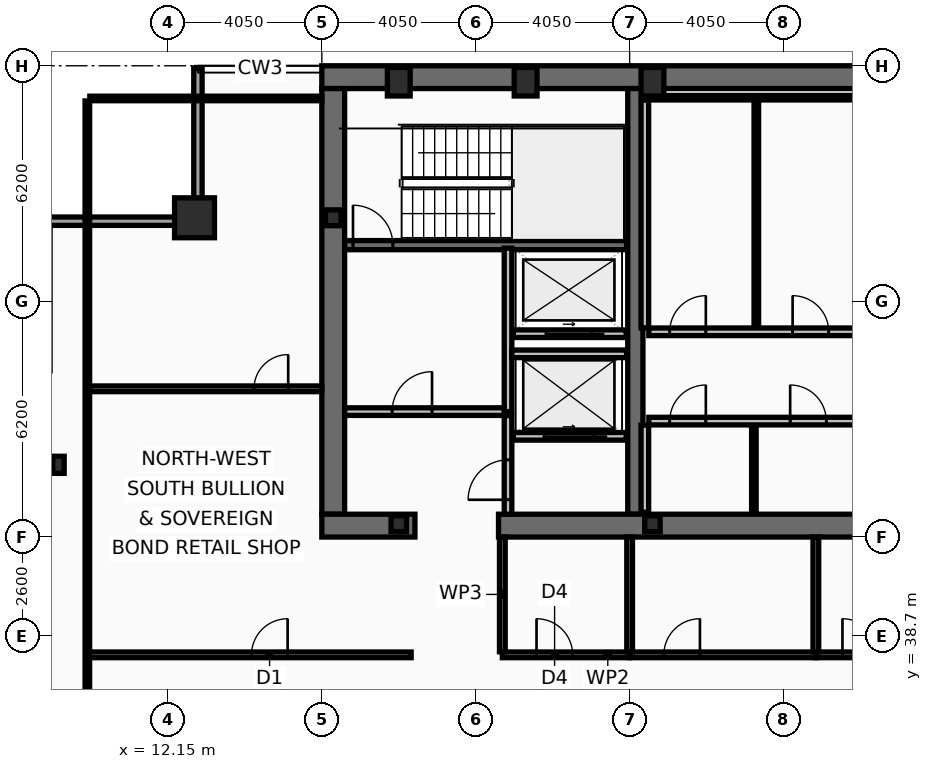
"""IFC4 building model, lengths in metres.
Left out: names, types, materials, properties, quantities, classifications, styles, units other than length and angle.
Written with IfcOpenShell. Run it as: python <this file> out.ifc"""

import sys

from ifc_helpers import new_model, si_unit, direction, frame, frame_2d, origin, origin_2d, place, context, subcontext, project, spatial, rectangle, hollow_rectangle, i_section, extrude, element, fill, save


model = new_model("IFC4")
c1 = context("Model", 3, precision=1e-05, world=origin(), true_north=direction((0.0, 1.0)))
c2 = subcontext(c1, "Body", "Model", "MODEL_VIEW")
j1 = project(units=[si_unit("LENGTHUNIT", "METRE"), si_unit("PLANEANGLEUNIT", "RADIAN")], contexts=[c1])
p1 = place(None, origin())
s1 = spatial("IfcSite", under=j1, at=p1, CompositionType="ELEMENT")
p2 = place(p1, origin())
s2 = spatial("IfcBuilding", under=s1, at=p2, CompositionType="ELEMENT")
p3 = place(p2, frame((0.0, 0.0, 253.4)))
s3 = spatial("IfcBuildingStorey", under=s2, at=p3, CompositionType="ELEMENT", Elevation=253.4)
p4 = place(p3, frame((16.2, 53.4, 0.0), z_axis=(0.0, 0.0, 1.0), x_axis=(1.0, 0.0, 0.0)))
e1 = element("IfcWall", 1, at=p4, inside=s3, PredefinedType="SHEAR", context=c2, shape_type="SweptSolid", body=[
    extrude(rectangle(XDim=40.5, YDim=0.6, at=frame_2d((20.25, 0.0))), origin(), (0.0, 0.0, 1.0), 3.38),
])
p5 = place(p3, frame((16.5, 41.9, 0.0), z_axis=(0.0, 0.0, 1.0), x_axis=(0.0, 1.0, 0.0)))
e2 = element("IfcWall", 2, at=p5, inside=s3, PredefinedType="SHEAR", context=c2, shape_type="SweptSolid", body=[
    extrude(rectangle(XDim=11.2, YDim=0.6, at=frame_2d((5.6, 0.0))), origin(), (0.0, 0.0, 1.0), 3.38),
])
p6 = place(p3, frame((24.45, 41.9, 0.0), z_axis=(0.0, 0.0, 1.0), x_axis=(0.0, 1.0, 0.0)))
e3 = element("IfcWall", 3, at=p6, inside=s3, PredefinedType="SHEAR", context=c2, shape_type="SweptSolid", body=[
    extrude(rectangle(XDim=11.2, YDim=0.4, at=frame_2d((5.6, 0.0))), origin(), (0.0, 0.0, 1.0), 3.38),
])
p7 = place(p3, frame((18.65, 41.6, 0.0), z_axis=(0.0, 0.0, 1.0), x_axis=(-1.0, 0.0, 0.0)))
e4 = element("IfcWall", 4, at=p7, inside=s3, PredefinedType="SHEAR", context=c2, shape_type="SweptSolid", body=[
    extrude(rectangle(XDim=2.45, YDim=0.6, at=frame_2d((1.225, 0.0))), origin(), (0.0, 0.0, 1.0), 3.38),
])
p8 = place(p3, frame((32.3, 41.6, 0.0), z_axis=(0.0, 0.0, 1.0), x_axis=(-1.0, 0.0, 0.0)))
e5 = element("IfcWall", 5, at=p8, inside=s3, PredefinedType="SHEAR", context=c2, shape_type="SweptSolid", body=[
    extrude(rectangle(XDim=11.45, YDim=0.6, at=frame_2d((5.725, 0.0))), origin(), (0.0, 0.0, 1.0), 3.38),
])
p9 = place(p3, frame((16.8, 48.98, 0.0), z_axis=(0.0, 0.0, 1.0), x_axis=(1.0, 0.0, 0.0)))
e6 = element("IfcWall", 6, at=p9, inside=s3, PredefinedType="SHEAR", context=c2, shape_type="SweptSolid", body=[
    extrude(rectangle(XDim=7.42, YDim=0.24, at=frame_2d((3.71, 0.0))), origin(), (0.0, 0.0, 1.0), 3.38),
])
p10 = place(p9, frame((0.22, 0.0, 0.0)))
e7 = element("IfcOpeningElement", 7, at=p10, cuts=e6, PredefinedType="OPENING", context=c2, shape_type="SweptSolid", body=[
    extrude(rectangle(XDim=1.05, YDim=2.15, at=frame_2d((0.525, 1.075))), frame((0.0, 0.13, 0.0), z_axis=(0.0, -1.0, 0.0), x_axis=(1.0, 0.0, 0.0)), (0.0, 0.0, 1.0), 0.26),
])
p11 = place(p3, frame((12.85, 49.7, 0.0), z_axis=(0.0, 0.0, 1.0), x_axis=(1.0, 0.0, 0.0)))
e8 = element("IfcColumn", 8, at=p11, inside=s3, PredefinedType="COLUMN", context=c2, shape_type="SweptSolid", body=[
    extrude(hollow_rectangle(XDim=1.05, YDim=1.05, WallThickness=0.055, at=origin_2d()), origin(), (0.0, 0.0, 1.0), 3.6),
])
for number, where, z_axis, x_axis in (
    (9, (18.225, 53.28, 0.0), (0.0, 0.0, 1.0), (1.0, 0.0, 0.0)),
    (10, (21.562, 53.28, 0.0), (0.0, 0.0, 1.0), (1.0, 0.0, 0.0)),
    (11, (24.9, 53.28, 0.0), (0.0, 0.0, 1.0), (1.0, 0.0, 0.0)),
):
    element("IfcColumn", number, at=place(p3, frame(where, z_axis=z_axis, x_axis=x_axis)), inside=s3, PredefinedType="COLUMN", context=c2, shape_type="SweptSolid", body=[
        extrude(hollow_rectangle(XDim=0.6, YDim=0.75, WallThickness=0.045, at=origin_2d()), origin(), (0.0, 0.0, 1.0), 3.6),
    ])
p12 = place(p3, frame((9.27, 43.2, 0.0), z_axis=(0.0, 0.0, 1.0), x_axis=(1.0, 0.0, 0.0)))
e12 = element("IfcColumn", 12, at=p12, inside=s3, PredefinedType="COLUMN", context=c2, shape_type="SweptSolid", body=[
    extrude(i_section(OverallWidth=0.3, OverallDepth=0.45, WebThickness=0.014, FlangeThickness=0.026, at=origin_2d()), origin(), (0.0, 0.0, 1.0), 3.6),
])
for number, where, z_axis, x_axis in (
    (13, (16.5, 49.7, 0.0), (0.0, 0.0, 1.0), (1.0, 0.0, 0.0)),
    (14, (18.225, 41.65, 0.0), (0.0, 0.0, 1.0), (1.0, 0.0, 0.0)),
    (15, (24.9, 41.65, 0.0), (0.0, 0.0, 1.0), (1.0, 0.0, 0.0)),
):
    element("IfcColumn", number, at=place(p3, frame(where, z_axis=z_axis, x_axis=x_axis)), inside=s3, PredefinedType="COLUMN", context=c2, shape_type="SweptSolid", body=[
        extrude(i_section(OverallWidth=0.406, OverallDepth=0.416, WebThickness=0.03, FlangeThickness=0.048, at=origin_2d()), origin(), (0.0, 0.0, 1.0), 3.6),
    ])
p13 = place(p3, frame((8.83, 49.61, 0.0), z_axis=(0.0, 0.0, 1.0), x_axis=(1.0, 0.0, 0.0)))
e16 = element("IfcWall", 16, at=p13, inside=s3, PredefinedType="SOLIDWALL", context=c2, shape_type="SweptSolid", body=[
    extrude(rectangle(XDim=4.22, YDim=0.22, at=frame_2d((2.11, 0.0))), origin(), (0.0, 0.0, 1.0), 2.77),
])
p14 = place(p3, frame((12.94, 49.72, 0.0), z_axis=(0.0, 0.0, 1.0), x_axis=(0.0, 1.0, 0.0)))
e17 = element("IfcWall", 17, at=p14, inside=s3, PredefinedType="SOLIDWALL", context=c2, shape_type="SweptSolid", body=[
    extrude(rectangle(XDim=3.91, YDim=0.22, at=frame_2d((1.955, 0.0))), origin(), (0.0, 0.0, 1.0), 2.77),
])
p15 = place(p3, frame((24.21, 43.95, 0.0), z_axis=(0.0, 0.0, 1.0), x_axis=(-1.0, 0.0, 0.0)))
e18 = element("IfcWall", 18, at=p15, inside=s3, PredefinedType="PARTITIONING", context=c2, shape_type="SweptSolid", body=[
    extrude(rectangle(XDim=2.97, YDim=0.2, at=frame_2d((1.485, 0.0))), origin(), (0.0, 0.0, 1.0), 3.38),
])
p16 = place(p15, frame((0.86, 0.0, 0.0)))
e19 = element("IfcOpeningElement", 19, at=p16, cuts=e18, PredefinedType="OPENING", context=c2, shape_type="SweptSolid", body=[
    extrude(rectangle(XDim=1.3, YDim=2.18, at=frame_2d((0.65, 1.09))), frame((0.0, 0.11, 0.0), z_axis=(0.0, -1.0, 0.0), x_axis=(1.0, 0.0, 0.0)), (0.0, 0.0, 1.0), 0.22),
])
p17 = place(p3, frame((24.21, 46.65, 0.0), z_axis=(0.0, 0.0, 1.0), x_axis=(-1.0, 0.0, 0.0)))
e20 = element("IfcWall", 20, at=p17, inside=s3, PredefinedType="PARTITIONING", context=c2, shape_type="SweptSolid", body=[
    extrude(rectangle(XDim=2.97, YDim=0.2, at=frame_2d((1.485, 0.0))), origin(), (0.0, 0.0, 1.0), 3.38),
])
p18 = place(p17, frame((0.91, 0.0, 0.0)))
e21 = element("IfcOpeningElement", 21, at=p18, cuts=e20, PredefinedType="OPENING", context=c2, shape_type="SweptSolid", body=[
    extrude(rectangle(XDim=1.2, YDim=2.18, at=frame_2d((0.6, 1.09))), frame((0.0, 0.11, 0.0), z_axis=(0.0, -1.0, 0.0), x_axis=(1.0, 0.0, 0.0)), (0.0, 0.0, 1.0), 0.22),
])
p19 = place(p3, frame((21.1, 44.6, 0.0), z_axis=(0.0, 0.0, 1.0), x_axis=(0.0, 1.0, 0.0)))
e22 = element("IfcWall", 22, at=p19, inside=s3, PredefinedType="PARTITIONING", context=c2, shape_type="SweptSolid", body=[
    extrude(rectangle(XDim=4.3, YDim=0.2, at=frame_2d((2.15, 0.0))), origin(), (0.0, 0.0, 1.0), 3.38),
])
p20 = place(p3, frame((16.8, 44.6, 0.0), z_axis=(0.0, 0.0, 1.0), x_axis=(1.0, 0.0, 0.0)))
e23 = element("IfcWall", 23, at=p20, inside=s3, PredefinedType="PARTITIONING", context=c2, shape_type="SweptSolid", body=[
    extrude(rectangle(XDim=4.2, YDim=0.2, at=frame_2d((2.1, 0.0))), origin(), (0.0, 0.0, 1.0), 3.38),
])
p21 = place(p20, frame((1.25, 0.0, 0.0)))
e24 = element("IfcOpeningElement", 24, at=p21, cuts=e23, PredefinedType="OPENING", context=c2, shape_type="SweptSolid", body=[
    extrude(rectangle(XDim=1.05, YDim=2.15, at=frame_2d((0.525, 1.075))), frame((0.0, 0.11, 0.0), z_axis=(0.0, -1.0, 0.0), x_axis=(1.0, 0.0, 0.0)), (0.0, 0.0, 1.0), 0.22),
])
p22 = place(p3, frame((21.2, 46.12, 0.0), z_axis=(0.0, 0.0, 1.0), x_axis=(1.0, 0.0, 0.0)))
e25 = element("IfcWall", 25, at=p22, inside=s3, PredefinedType="PARTITIONING", context=c2, shape_type="SweptSolid", body=[
    extrude(rectangle(XDim=3.02, YDim=0.2, at=frame_2d((1.51, 0.0))), origin(), (0.0, 0.0, 1.0), 3.38),
])
p23 = place(p3, frame((21.1, 41.9, 0.0), z_axis=(0.0, 0.0, 1.0), x_axis=(0.0, 1.0, 0.0)))
e26 = element("IfcWall", 26, at=p23, inside=s3, PredefinedType="PARTITIONING", context=c2, shape_type="SweptSolid", body=[
    extrude(rectangle(XDim=2.595, YDim=0.2, at=frame_2d((1.298, 0.0))), origin(), (0.0, 0.0, 1.0), 3.38),
])
p24 = place(p23, frame((0.38, 0.0, 0.0)))
e27 = element("IfcOpeningElement", 27, at=p24, cuts=e26, PredefinedType="OPENING", context=c2, shape_type="SweptSolid", body=[
    extrude(rectangle(XDim=1.05, YDim=2.15, at=frame_2d((0.525, 1.075))), frame((0.0, 0.11, 0.0), z_axis=(0.0, -1.0, 0.0), x_axis=(1.0, 0.0, 0.0)), (0.0, 0.0, 1.0), 0.22),
])
p25 = place(p3, frame((24.7, 46.805, 0.0), z_axis=(0.0, 0.0, 1.0), x_axis=(0.0, 1.0, 0.0)))
e28 = element("IfcWall", 28, at=p25, inside=s3, PredefinedType="PARTITIONING", context=c2, shape_type="SweptSolid", body=[
    extrude(rectangle(XDim=5.99, YDim=0.2, at=frame_2d((2.995, 0.0))), origin(), (0.0, 0.0, 1.0), 3.38),
])
p26 = place(p3, frame((24.805, 52.86, 0.0), z_axis=(0.0, 0.0, 1.0), x_axis=(1.0, 0.0, 0.0)))
e29 = element("IfcWall", 29, at=p26, inside=s3, PredefinedType="PARTITIONING", context=c2, shape_type="SweptSolid", body=[
    extrude(rectangle(XDim=7.51, YDim=0.12, at=frame_2d((3.755, 0.0))), origin(), (0.0, 0.0, 1.0), 3.38),
])
p27 = place(p3, frame((27.634, 46.805, 0.0), z_axis=(0.0, 0.0, 1.0), x_axis=(0.0, 1.0, 0.0)))
e30 = element("IfcWall", 30, at=p27, inside=s3, PredefinedType="PARTITIONING", context=c2, shape_type="SweptSolid", body=[
    extrude(rectangle(XDim=5.99, YDim=0.12, at=frame_2d((2.995, 0.0))), origin(), (0.0, 0.0, 1.0), 3.38),
])
p28 = place(p3, frame((24.805, 46.7, 0.0), z_axis=(0.0, 0.0, 1.0), x_axis=(1.0, 0.0, 0.0)))
e31 = element("IfcWall", 31, at=p28, inside=s3, PredefinedType="PARTITIONING", context=c2, shape_type="SweptSolid", body=[
    extrude(rectangle(XDim=7.51, YDim=0.2, at=frame_2d((3.755, 0.0))), origin(), (0.0, 0.0, 1.0), 3.38),
])
p29 = place(p28, frame((0.55, 0.0, 0.0)))
e32 = element("IfcOpeningElement", 32, at=p29, cuts=e31, PredefinedType="OPENING", context=c2, shape_type="SweptSolid", body=[
    extrude(rectangle(XDim=0.95, YDim=2.1, at=frame_2d((0.475, 1.05))), frame((0.0, 0.11, 0.0), z_axis=(0.0, -1.0, 0.0), x_axis=(1.0, 0.0, 0.0)), (0.0, 0.0, 1.0), 0.22),
])
p30 = place(p28, frame((3.784, 0.0, 0.0)))
e33 = element("IfcOpeningElement", 33, at=p30, cuts=e31, PredefinedType="OPENING", context=c2, shape_type="SweptSolid", body=[
    extrude(rectangle(XDim=0.95, YDim=2.1, at=frame_2d((0.475, 1.05))), frame((0.0, 0.11, 0.0), z_axis=(0.0, -1.0, 0.0), x_axis=(1.0, 0.0, 0.0)), (0.0, 0.0, 1.0), 0.22),
])
p31 = place(p3, frame((24.7, 41.95, 0.0), z_axis=(0.0, 0.0, 1.0), x_axis=(0.0, 1.0, 0.0)))
e34 = element("IfcWall", 34, at=p31, inside=s3, PredefinedType="PARTITIONING", context=c2, shape_type="SweptSolid", body=[
    extrude(rectangle(XDim=2.295, YDim=0.2, at=frame_2d((1.147, 0.0))), origin(), (0.0, 0.0, 1.0), 3.38),
])
p32 = place(p3, frame((27.569, 41.95, 0.0), z_axis=(0.0, 0.0, 1.0), x_axis=(0.0, 1.0, 0.0)))
e35 = element("IfcWall", 35, at=p32, inside=s3, PredefinedType="PARTITIONING", context=c2, shape_type="SweptSolid", body=[
    extrude(rectangle(XDim=2.295, YDim=0.12, at=frame_2d((1.147, 0.0))), origin(), (0.0, 0.0, 1.0), 3.38),
])
p33 = place(p3, frame((24.805, 44.35, 0.0), z_axis=(0.0, 0.0, 1.0), x_axis=(1.0, 0.0, 0.0)))
e36 = element("IfcWall", 36, at=p33, inside=s3, PredefinedType="PARTITIONING", context=c2, shape_type="SweptSolid", body=[
    extrude(rectangle(XDim=7.34, YDim=0.2, at=frame_2d((3.67, 0.0))), origin(), (0.0, 0.0, 1.0), 3.38),
])
p34 = place(p33, frame((0.55, 0.0, 0.0)))
e37 = element("IfcOpeningElement", 37, at=p34, cuts=e36, PredefinedType="OPENING", context=c2, shape_type="SweptSolid", body=[
    extrude(rectangle(XDim=0.95, YDim=2.1, at=frame_2d((0.475, 1.05))), frame((0.0, 0.11, 0.0), z_axis=(0.0, -1.0, 0.0), x_axis=(1.0, 0.0, 0.0)), (0.0, 0.0, 1.0), 0.22),
])
p35 = place(p33, frame((3.719, 0.0, 0.0)))
e38 = element("IfcOpeningElement", 38, at=p35, cuts=e36, PredefinedType="OPENING", context=c2, shape_type="SweptSolid", body=[
    extrude(rectangle(XDim=0.95, YDim=2.1, at=frame_2d((0.475, 1.05))), frame((0.0, 0.11, 0.0), z_axis=(0.0, -1.0, 0.0), x_axis=(1.0, 0.0, 0.0)), (0.0, 0.0, 1.0), 0.22),
])
p36 = place(p3, frame((20.95, 38.2, 0.0), z_axis=(0.0, 0.0, 1.0), x_axis=(1.0, 0.0, 0.0)))
e39 = element("IfcWall", 39, at=p36, inside=s3, PredefinedType="PARTITIONING", context=c2, shape_type="SweptSolid", body=[
    extrude(rectangle(XDim=3.35, YDim=0.15, at=frame_2d((1.675, 0.0))), origin(), (0.0, 0.0, 1.0), 3.38),
])
p37 = place(p36, frame((0.9, 0.0, 0.0)))
e40 = element("IfcOpeningElement", 40, at=p37, cuts=e39, PredefinedType="OPENING", context=c2, shape_type="SweptSolid", body=[
    extrude(rectangle(XDim=0.95, YDim=2.05, at=frame_2d((0.475, 1.025))), frame((0.0, 0.085, 0.0), z_axis=(0.0, -1.0, 0.0), x_axis=(1.0, 0.0, 0.0)), (0.0, 0.0, 1.0), 0.17),
])
p38 = place(p3, frame((24.3, 38.2, 0.0), z_axis=(0.0, 0.0, 1.0), x_axis=(1.0, 0.0, 0.0)))
e41 = element("IfcWall", 41, at=p38, inside=s3, PredefinedType="PARTITIONING", context=c2, shape_type="SweptSolid", body=[
    extrude(rectangle(XDim=4.9, YDim=0.15, at=frame_2d((2.45, 0.0))), origin(), (0.0, 0.0, 1.0), 2.72),
])
p39 = place(p38, frame((0.9, 0.0, 0.0)))
e42 = element("IfcOpeningElement", 42, at=p39, cuts=e41, PredefinedType="OPENING", context=c2, shape_type="SweptSolid", body=[
    extrude(rectangle(XDim=0.95, YDim=2.05, at=frame_2d((0.475, 1.025))), frame((0.0, 0.085, 0.0), z_axis=(0.0, -1.0, 0.0), x_axis=(1.0, 0.0, 0.0)), (0.0, 0.0, 1.0), 0.17),
])
p40 = place(p3, frame((29.2, 38.2, 0.0), z_axis=(0.0, 0.0, 1.0), x_axis=(1.0, 0.0, 0.0)))
e43 = element("IfcWall", 43, at=p40, inside=s3, PredefinedType="PARTITIONING", context=c2, shape_type="SweptSolid", body=[
    extrude(rectangle(XDim=2.98, YDim=0.15, at=frame_2d((1.49, 0.0))), origin(), (0.0, 0.0, 1.0), 2.72),
])
p41 = place(p40, frame((0.7, 0.0, 0.0)))
e44 = element("IfcOpeningElement", 44, at=p41, cuts=e43, PredefinedType="OPENING", context=c2, shape_type="SweptSolid", body=[
    extrude(rectangle(XDim=0.95, YDim=2.05, at=frame_2d((0.475, 1.025))), frame((0.0, 0.085, 0.0), z_axis=(0.0, -1.0, 0.0), x_axis=(1.0, 0.0, 0.0)), (0.0, 0.0, 1.0), 0.17),
])
for number, where, z_axis, x_axis in (
    (45, (20.95, 38.28, 0.0), (0.0, 0.0, 1.0), (0.0, 1.0, 0.0)),
    (46, (24.3, 38.28, 0.0), (0.0, 0.0, 1.0), (0.0, 1.0, 0.0)),
    (47, (29.2, 38.28, 0.0), (0.0, 0.0, 1.0), (0.0, 1.0, 0.0)),
):
    element("IfcWall", number, at=place(p3, frame(where, z_axis=z_axis, x_axis=x_axis)), inside=s3, PredefinedType="PARTITIONING", context=c2, shape_type="SweptSolid", body=[
        extrude(rectangle(XDim=3.02, YDim=0.15, at=frame_2d((1.51, 0.0))), origin(), (0.0, 0.0, 1.0), 3.38),
    ])
p42 = place(p3, frame((10.03, 38.2, 0.0), z_axis=(0.0, 0.0, 1.0), x_axis=(1.0, 0.0, 0.0)))
e48 = element("IfcWall", 48, at=p42, inside=s3, PredefinedType="PARTITIONING", context=c2, shape_type="SweptSolid", body=[
    extrude(rectangle(XDim=8.52, YDim=0.15, at=frame_2d((4.26, 0.0))), origin(), (0.0, 0.0, 1.0), 2.72),
])
p43 = place(p42, frame((4.32, 0.0, 0.0)))
e49 = element("IfcOpeningElement", 49, at=p43, cuts=e48, PredefinedType="OPENING", context=c2, shape_type="SweptSolid", body=[
    extrude(rectangle(XDim=0.95, YDim=2.05, at=frame_2d((0.475, 1.025))), frame((0.0, 0.085, 0.0), z_axis=(0.0, -1.0, 0.0), x_axis=(1.0, 0.0, 0.0)), (0.0, 0.0, 1.0), 0.17),
])
p44 = place(p3, frame((10.095, 45.2, 0.0), z_axis=(0.0, 0.0, 1.0), x_axis=(1.0, 0.0, 0.0)))
e50 = element("IfcWall", 50, at=p44, inside=s3, PredefinedType="PARTITIONING", context=c2, shape_type="SweptSolid", body=[
    extrude(rectangle(XDim=6.105, YDim=0.15, at=frame_2d((3.052, 0.0))), origin(), (0.0, 0.0, 1.0), 2.77),
])
p45 = place(p44, frame((4.32, 0.0, 0.0)))
e51 = element("IfcOpeningElement", 51, at=p45, cuts=e50, PredefinedType="OPENING", context=c2, shape_type="SweptSolid", body=[
    extrude(rectangle(XDim=0.9, YDim=2.05, at=frame_2d((0.45, 1.025))), frame((0.0, 0.085, 0.0), z_axis=(0.0, -1.0, 0.0), x_axis=(1.0, 0.0, 0.0)), (0.0, 0.0, 1.0), 0.17),
])
p46 = place(p3, frame((10.03, 10.665, 0.0), z_axis=(0.0, 0.0, 1.0), x_axis=(0.0, 1.0, 0.0)))
e52 = element("IfcWall", 52, at=p46, inside=s3, PredefinedType="PARTITIONING", context=c2, shape_type="SweptSolid", body=[
    extrude(rectangle(XDim=42.11, YDim=0.12, at=frame_2d((21.055, 0.0))), origin(), (0.0, 0.0, 1.0), 2.72),
])
p47 = place(p3, frame((10.095, 52.84, 0.0), z_axis=(0.0, 0.0, 1.0), x_axis=(1.0, 0.0, 0.0)))
e53 = element("IfcWall", 53, at=p47, inside=s3, PredefinedType="PARTITIONING", context=c2, shape_type="SweptSolid", body=[
    extrude(rectangle(XDim=6.105, YDim=0.12, at=frame_2d((3.052, 0.0))), origin(), (0.0, 0.0, 1.0), 3.38),
])
p48 = place(p10, origin())
e54 = element("IfcDoor", 54, at=p48, inside=s3, OperationType="SINGLE_SWING_LEFT", PredefinedType="DOOR", context=c2, shape_type="SweptSolid", body=[
    extrude(rectangle(XDim=1.05, YDim=2.15, at=frame_2d((0.525, 1.075))), frame((0.0, 0.025, 0.0), z_axis=(0.0, -1.0, 0.0), x_axis=(1.0, 0.0, 0.0)), (0.0, 0.0, 1.0), 0.05),
])
fill(e7, e54)
p49 = place(p16, origin())
e55 = element("IfcDoor", 55, at=p49, inside=s3, OperationType="SLIDING_TO_LEFT", PredefinedType="DOOR", context=c2, shape_type="SweptSolid", body=[
    extrude(rectangle(XDim=1.3, YDim=2.18, at=frame_2d((0.65, 1.09))), frame((0.0, 0.025, 0.0), z_axis=(0.0, -1.0, 0.0), x_axis=(1.0, 0.0, 0.0)), (0.0, 0.0, 1.0), 0.05),
])
fill(e19, e55)
p50 = place(p18, origin())
e56 = element("IfcDoor", 56, at=p50, inside=s3, OperationType="SLIDING_TO_LEFT", PredefinedType="DOOR", context=c2, shape_type="SweptSolid", body=[
    extrude(rectangle(XDim=1.2, YDim=2.18, at=frame_2d((0.6, 1.09))), frame((0.0, 0.025, 0.0), z_axis=(0.0, -1.0, 0.0), x_axis=(1.0, 0.0, 0.0)), (0.0, 0.0, 1.0), 0.05),
])
fill(e21, e56)
p51 = place(p21, origin())
e57 = element("IfcDoor", 57, at=p51, inside=s3, OperationType="SINGLE_SWING_RIGHT", PredefinedType="DOOR", context=c2, shape_type="SweptSolid", body=[
    extrude(rectangle(XDim=1.05, YDim=2.15, at=frame_2d((0.525, 1.075))), frame((0.0, 0.025, 0.0), z_axis=(0.0, -1.0, 0.0), x_axis=(1.0, 0.0, 0.0)), (0.0, 0.0, 1.0), 0.05),
])
fill(e24, e57)
p52 = place(p24, origin())
e58 = element("IfcDoor", 58, at=p52, inside=s3, OperationType="SINGLE_SWING_LEFT", PredefinedType="DOOR", context=c2, shape_type="SweptSolid", body=[
    extrude(rectangle(XDim=1.05, YDim=2.15, at=frame_2d((0.525, 1.075))), frame((0.0, 0.025, 0.0), z_axis=(0.0, -1.0, 0.0), x_axis=(1.0, 0.0, 0.0)), (0.0, 0.0, 1.0), 0.05),
])
fill(e27, e58)
p53 = place(p29, origin())
e59 = element("IfcDoor", 59, at=p53, inside=s3, OperationType="SINGLE_SWING_RIGHT", PredefinedType="DOOR", context=c2, shape_type="SweptSolid", body=[
    extrude(rectangle(XDim=0.95, YDim=2.1, at=frame_2d((0.475, 1.05))), frame((0.0, 0.025, 0.0), z_axis=(0.0, -1.0, 0.0), x_axis=(1.0, 0.0, 0.0)), (0.0, 0.0, 1.0), 0.05),
])
fill(e32, e59)
p54 = place(p30, origin())
e60 = element("IfcDoor", 60, at=p54, inside=s3, OperationType="SINGLE_SWING_LEFT", PredefinedType="DOOR", context=c2, shape_type="SweptSolid", body=[
    extrude(rectangle(XDim=0.95, YDim=2.1, at=frame_2d((0.475, 1.05))), frame((0.0, 0.025, 0.0), z_axis=(0.0, -1.0, 0.0), x_axis=(1.0, 0.0, 0.0)), (0.0, 0.0, 1.0), 0.05),
])
fill(e33, e60)
p55 = place(p34, origin())
e61 = element("IfcDoor", 61, at=p55, inside=s3, OperationType="SINGLE_SWING_RIGHT", PredefinedType="DOOR", context=c2, shape_type="SweptSolid", body=[
    extrude(rectangle(XDim=0.95, YDim=2.1, at=frame_2d((0.475, 1.05))), frame((0.0, 0.025, 0.0), z_axis=(0.0, -1.0, 0.0), x_axis=(1.0, 0.0, 0.0)), (0.0, 0.0, 1.0), 0.05),
])
fill(e37, e61)
p56 = place(p35, origin())
e62 = element("IfcDoor", 62, at=p56, inside=s3, OperationType="SINGLE_SWING_LEFT", PredefinedType="DOOR", context=c2, shape_type="SweptSolid", body=[
    extrude(rectangle(XDim=0.95, YDim=2.1, at=frame_2d((0.475, 1.05))), frame((0.0, 0.025, 0.0), z_axis=(0.0, -1.0, 0.0), x_axis=(1.0, 0.0, 0.0)), (0.0, 0.0, 1.0), 0.05),
])
fill(e38, e62)
p57 = place(p37, origin())
e63 = element("IfcDoor", 63, at=p57, inside=s3, OperationType="SINGLE_SWING_LEFT", PredefinedType="DOOR", context=c2, shape_type="SweptSolid", body=[
    extrude(rectangle(XDim=0.95, YDim=2.05, at=frame_2d((0.475, 1.025))), frame((0.0, 0.025, 0.0), z_axis=(0.0, -1.0, 0.0), x_axis=(1.0, 0.0, 0.0)), (0.0, 0.0, 1.0), 0.05),
])
fill(e40, e63)
p58 = place(p39, origin())
e64 = element("IfcDoor", 64, at=p58, inside=s3, OperationType="SINGLE_SWING_RIGHT", PredefinedType="DOOR", context=c2, shape_type="SweptSolid", body=[
    extrude(rectangle(XDim=0.95, YDim=2.05, at=frame_2d((0.475, 1.025))), frame((0.0, 0.025, 0.0), z_axis=(0.0, -1.0, 0.0), x_axis=(1.0, 0.0, 0.0)), (0.0, 0.0, 1.0), 0.05),
])
fill(e42, e64)
p59 = place(p41, origin())
e65 = element("IfcDoor", 65, at=p59, inside=s3, OperationType="SINGLE_SWING_LEFT", PredefinedType="DOOR", context=c2, shape_type="SweptSolid", body=[
    extrude(rectangle(XDim=0.95, YDim=2.05, at=frame_2d((0.475, 1.025))), frame((0.0, 0.025, 0.0), z_axis=(0.0, -1.0, 0.0), x_axis=(1.0, 0.0, 0.0)), (0.0, 0.0, 1.0), 0.05),
])
fill(e44, e65)
p60 = place(p43, origin())
e66 = element("IfcDoor", 66, at=p60, inside=s3, OperationType="SINGLE_SWING_RIGHT", PredefinedType="DOOR", context=c2, shape_type="SweptSolid", body=[
    extrude(rectangle(XDim=0.95, YDim=2.05, at=frame_2d((0.475, 1.025))), frame((0.0, 0.025, 0.0), z_axis=(0.0, -1.0, 0.0), x_axis=(1.0, 0.0, 0.0)), (0.0, 0.0, 1.0), 0.05),
])
fill(e49, e66)
p61 = place(p45, origin())
e67 = element("IfcDoor", 67, at=p61, inside=s3, OperationType="SINGLE_SWING_RIGHT", PredefinedType="DOOR", context=c2, shape_type="SweptSolid", body=[
    extrude(rectangle(XDim=0.9, YDim=2.05, at=frame_2d((0.45, 1.025))), frame((0.0, 0.025, 0.0), z_axis=(0.0, -1.0, 0.0), x_axis=(1.0, 0.0, 0.0)), (0.0, 0.0, 1.0), 0.05),
])
fill(e51, e67)
save(model, sys.argv[1])
